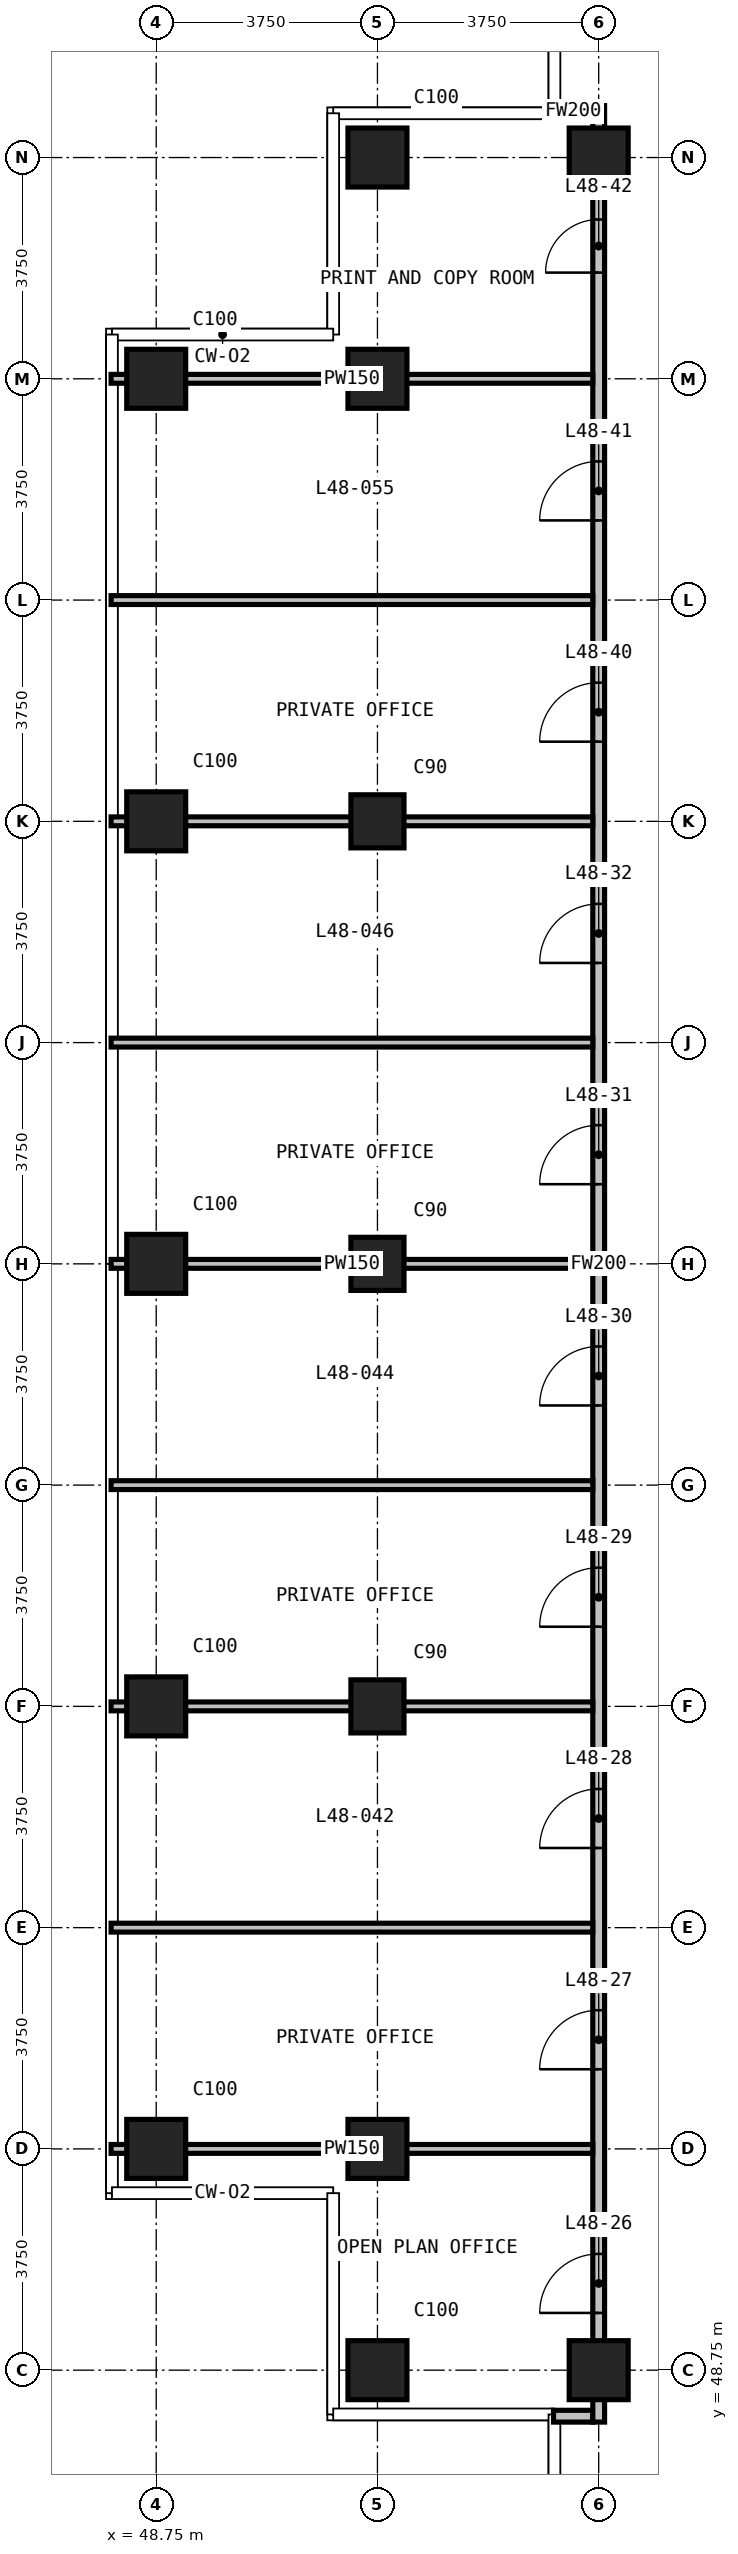
"""IFC4 building model, lengths in metres.
Left out: names, types, materials, properties, quantities, classifications, styles, units other than length and angle.
Written with IfcOpenShell. Run it as: python <this file> out.ifc"""

import sys

from ifc_helpers import new_model, si_unit, direction, frame, frame_2d, origin, origin_2d, place, context, subcontext, project, spatial, rectangle, extrude, element, fill, save


model = new_model("IFC4")
c1 = context("Model", 3, precision=1e-05, world=origin(), true_north=direction((0.0, 1.0)))
c2 = subcontext(c1, "Body", "Model", "MODEL_VIEW")
j1 = project(units=[si_unit("LENGTHUNIT", "METRE"), si_unit("PLANEANGLEUNIT", "RADIAN")], contexts=[c1])
p1 = place(None, origin())
s1 = spatial("IfcSite", under=j1, at=p1, CompositionType="ELEMENT")
p2 = place(p1, origin())
s2 = spatial("IfcBuilding", under=s1, at=p2, CompositionType="ELEMENT")
p3 = place(p2, frame((0.0, 0.0, 188.7)))
s3 = spatial("IfcBuildingStorey", under=s2, at=p3, CompositionType="ELEMENT", Elevation=188.7)
for number, where, z_axis, x_axis in (
    (1, (48.75, 52.5, 0.0), (0.0, 0.0, 1.0), (1.0, 0.0, 0.0)),
    (2, (48.75, 60.0, 0.0), (0.0, 0.0, 1.0), (1.0, 0.0, 0.0)),
    (3, (48.75, 67.5, 0.0), (0.0, 0.0, 1.0), (1.0, 0.0, 0.0)),
    (4, (48.75, 75.0, 0.0), (0.0, 0.0, 1.0), (1.0, 0.0, 0.0)),
    (5, (48.75, 82.5, 0.0), (0.0, 0.0, 1.0), (1.0, 0.0, 0.0)),
    (6, (52.5, 48.75, 0.0), (0.0, 0.0, 1.0), (1.0, 0.0, 0.0)),
    (7, (52.5, 52.5, 0.0), (0.0, 0.0, 1.0), (1.0, 0.0, 0.0)),
):
    element("IfcColumn", number, at=place(p3, frame(where, z_axis=z_axis, x_axis=x_axis)), inside=s3, PredefinedType="COLUMN", context=c2, shape_type="SweptSolid", body=[
        extrude(rectangle(XDim=1.0, YDim=1.0, at=origin_2d()), origin(), (0.0, 0.0, 1.0), 3.6),
    ])
for number, where, z_axis, x_axis in (
    (8, (52.5, 60.0, 0.0), (0.0, 0.0, 1.0), (1.0, 0.0, 0.0)),
    (9, (52.5, 67.5, 0.0), (0.0, 0.0, 1.0), (1.0, 0.0, 0.0)),
    (10, (52.5, 75.0, 0.0), (0.0, 0.0, 1.0), (1.0, 0.0, 0.0)),
):
    element("IfcColumn", number, at=place(p3, frame(where, z_axis=z_axis, x_axis=x_axis)), inside=s3, PredefinedType="COLUMN", context=c2, shape_type="SweptSolid", body=[
        extrude(rectangle(XDim=0.9, YDim=0.9, at=origin_2d()), origin(), (0.0, 0.0, 1.0), 3.6),
    ])
for number, where, z_axis, x_axis in (
    (11, (52.5, 82.5, 0.0), (0.0, 0.0, 1.0), (1.0, 0.0, 0.0)),
    (12, (52.5, 86.25, 0.0), (0.0, 0.0, 1.0), (1.0, 0.0, 0.0)),
    (13, (56.25, 48.75, 0.0), (0.0, 0.0, 1.0), (1.0, 0.0, 0.0)),
    (14, (56.25, 86.25, 0.0), (0.0, 0.0, 1.0), (1.0, 0.0, 0.0)),
):
    element("IfcColumn", number, at=place(p3, frame(where, z_axis=z_axis, x_axis=x_axis)), inside=s3, PredefinedType="COLUMN", context=c2, shape_type="SweptSolid", body=[
        extrude(rectangle(XDim=1.0, YDim=1.0, at=origin_2d()), origin(), (0.0, 0.0, 1.0), 3.6),
    ])
for number, where, z_axis, x_axis in (
    (15, (55.485, 47.97, 0.0), (0.0, 0.0, 1.0), (1.0, 0.0, 0.0)),
    (16, (55.485, 87.03, 0.0), (0.0, 0.0, 1.0), (1.0, 0.0, 0.0)),
):
    element("IfcWall", number, at=place(p3, frame(where, z_axis=z_axis, x_axis=x_axis)), inside=s3, PredefinedType="PARTITIONING", context=c2, shape_type="SweptSolid", body=[
        extrude(rectangle(XDim=0.665, YDim=0.2, at=frame_2d((0.333, 0.0))), origin(), (0.0, 0.0, 1.0), 3.3),
    ])
p4 = place(p3, frame((56.25, 47.87, 0.0), z_axis=(0.0, 0.0, 1.0), x_axis=(0.0, 1.0, 0.0)))
e17 = element("IfcWall", 17, at=p4, inside=s3, PredefinedType="PARTITIONING", context=c2, shape_type="SweptSolid", body=[
    extrude(rectangle(XDim=39.26, YDim=0.2, at=frame_2d((19.63, 0.0))), origin(), (0.0, 0.0, 1.0), 3.3),
])
p5 = place(p4, frame((1.85, 0.0, 0.0)))
e18 = element("IfcOpeningElement", 18, at=p5, cuts=e17, PredefinedType="OPENING", context=c2, shape_type="SweptSolid", body=[
    extrude(rectangle(XDim=1.0, YDim=2.2, at=frame_2d((0.5, 1.1))), frame((0.0, 0.11, 0.0), z_axis=(0.0, -1.0, 0.0), x_axis=(1.0, 0.0, 0.0)), (0.0, 0.0, 1.0), 0.22),
])
p6 = place(p4, frame((5.98, 0.0, 0.0)))
e19 = element("IfcOpeningElement", 19, at=p6, cuts=e17, PredefinedType="OPENING", context=c2, shape_type="SweptSolid", body=[
    extrude(rectangle(XDim=1.0, YDim=2.2, at=frame_2d((0.5, 1.1))), frame((0.0, 0.11, 0.0), z_axis=(0.0, -1.0, 0.0), x_axis=(1.0, 0.0, 0.0)), (0.0, 0.0, 1.0), 0.22),
])
p7 = place(p4, frame((9.73, 0.0, 0.0)))
e20 = element("IfcOpeningElement", 20, at=p7, cuts=e17, PredefinedType="OPENING", context=c2, shape_type="SweptSolid", body=[
    extrude(rectangle(XDim=1.0, YDim=2.2, at=frame_2d((0.5, 1.1))), frame((0.0, 0.11, 0.0), z_axis=(0.0, -1.0, 0.0), x_axis=(1.0, 0.0, 0.0)), (0.0, 0.0, 1.0), 0.22),
])
p8 = place(p4, frame((13.48, 0.0, 0.0)))
e21 = element("IfcOpeningElement", 21, at=p8, cuts=e17, PredefinedType="OPENING", context=c2, shape_type="SweptSolid", body=[
    extrude(rectangle(XDim=1.0, YDim=2.2, at=frame_2d((0.5, 1.1))), frame((0.0, 0.11, 0.0), z_axis=(0.0, -1.0, 0.0), x_axis=(1.0, 0.0, 0.0)), (0.0, 0.0, 1.0), 0.22),
])
p9 = place(p4, frame((17.23, 0.0, 0.0)))
e22 = element("IfcOpeningElement", 22, at=p9, cuts=e17, PredefinedType="OPENING", context=c2, shape_type="SweptSolid", body=[
    extrude(rectangle(XDim=1.0, YDim=2.2, at=frame_2d((0.5, 1.1))), frame((0.0, 0.11, 0.0), z_axis=(0.0, -1.0, 0.0), x_axis=(1.0, 0.0, 0.0)), (0.0, 0.0, 1.0), 0.22),
])
p10 = place(p4, frame((20.98, 0.0, 0.0)))
e23 = element("IfcOpeningElement", 23, at=p10, cuts=e17, PredefinedType="OPENING", context=c2, shape_type="SweptSolid", body=[
    extrude(rectangle(XDim=1.0, YDim=2.2, at=frame_2d((0.5, 1.1))), frame((0.0, 0.11, 0.0), z_axis=(0.0, -1.0, 0.0), x_axis=(1.0, 0.0, 0.0)), (0.0, 0.0, 1.0), 0.22),
])
p11 = place(p4, frame((24.73, 0.0, 0.0)))
e24 = element("IfcOpeningElement", 24, at=p11, cuts=e17, PredefinedType="OPENING", context=c2, shape_type="SweptSolid", body=[
    extrude(rectangle(XDim=1.0, YDim=2.2, at=frame_2d((0.5, 1.1))), frame((0.0, 0.11, 0.0), z_axis=(0.0, -1.0, 0.0), x_axis=(1.0, 0.0, 0.0)), (0.0, 0.0, 1.0), 0.22),
])
p12 = place(p4, frame((28.48, 0.0, 0.0)))
e25 = element("IfcOpeningElement", 25, at=p12, cuts=e17, PredefinedType="OPENING", context=c2, shape_type="SweptSolid", body=[
    extrude(rectangle(XDim=1.0, YDim=2.2, at=frame_2d((0.5, 1.1))), frame((0.0, 0.11, 0.0), z_axis=(0.0, -1.0, 0.0), x_axis=(1.0, 0.0, 0.0)), (0.0, 0.0, 1.0), 0.22),
])
p13 = place(p4, frame((32.23, 0.0, 0.0)))
e26 = element("IfcOpeningElement", 26, at=p13, cuts=e17, PredefinedType="OPENING", context=c2, shape_type="SweptSolid", body=[
    extrude(rectangle(XDim=1.0, YDim=2.2, at=frame_2d((0.5, 1.1))), frame((0.0, 0.11, 0.0), z_axis=(0.0, -1.0, 0.0), x_axis=(1.0, 0.0, 0.0)), (0.0, 0.0, 1.0), 0.22),
])
p14 = place(p4, frame((36.43, 0.0, 0.0)))
e27 = element("IfcOpeningElement", 27, at=p14, cuts=e17, PredefinedType="OPENING", context=c2, shape_type="SweptSolid", body=[
    extrude(rectangle(XDim=0.9, YDim=2.2, at=frame_2d((0.45, 1.1))), frame((0.0, 0.11, 0.0), z_axis=(0.0, -1.0, 0.0), x_axis=(1.0, 0.0, 0.0)), (0.0, 0.0, 1.0), 0.22),
])
for number, where, z_axis, x_axis in (
    (28, (47.985, 52.5, 0.0), (0.0, 0.0, 1.0), (1.0, 0.0, 0.0)),
    (29, (47.985, 56.25, 0.0), (0.0, 0.0, 1.0), (1.0, 0.0, 0.0)),
    (30, (47.985, 60.0, 0.0), (0.0, 0.0, 1.0), (1.0, 0.0, 0.0)),
    (31, (47.985, 63.75, 0.0), (0.0, 0.0, 1.0), (1.0, 0.0, 0.0)),
    (32, (47.985, 67.5, 0.0), (0.0, 0.0, 1.0), (1.0, 0.0, 0.0)),
    (33, (47.985, 71.25, 0.0), (0.0, 0.0, 1.0), (1.0, 0.0, 0.0)),
    (34, (47.985, 75.0, 0.0), (0.0, 0.0, 1.0), (1.0, 0.0, 0.0)),
    (35, (47.985, 78.75, 0.0), (0.0, 0.0, 1.0), (1.0, 0.0, 0.0)),
    (36, (47.985, 82.5, 0.0), (0.0, 0.0, 1.0), (1.0, 0.0, 0.0)),
):
    element("IfcWall", number, at=place(p3, frame(where, z_axis=z_axis, x_axis=x_axis)), inside=s3, PredefinedType="PARTITIONING", context=c2, shape_type="SweptSolid", body=[
        extrude(rectangle(XDim=8.165, YDim=0.15, at=frame_2d((4.083, 0.0))), origin(), (0.0, 0.0, 1.0), 3.3),
    ])
p15 = place(p5, origin())
e37 = element("IfcDoor", 37, at=p15, inside=s3, OperationType="SINGLE_SWING_RIGHT", PredefinedType="DOOR", context=c2, shape_type="SweptSolid", body=[
    extrude(rectangle(XDim=1.0, YDim=2.2, at=frame_2d((0.5, 1.1))), frame((0.0, 0.025, 0.0), z_axis=(0.0, -1.0, 0.0), x_axis=(1.0, 0.0, 0.0)), (0.0, 0.0, 1.0), 0.05),
])
fill(e18, e37)
p16 = place(p6, origin())
e38 = element("IfcDoor", 38, at=p16, inside=s3, OperationType="SINGLE_SWING_LEFT", PredefinedType="DOOR", context=c2, shape_type="SweptSolid", body=[
    extrude(rectangle(XDim=1.0, YDim=2.2, at=frame_2d((0.5, 1.1))), frame((0.0, 0.025, 0.0), z_axis=(0.0, -1.0, 0.0), x_axis=(1.0, 0.0, 0.0)), (0.0, 0.0, 1.0), 0.05),
])
fill(e19, e38)
p17 = place(p7, origin())
e39 = element("IfcDoor", 39, at=p17, inside=s3, OperationType="SINGLE_SWING_LEFT", PredefinedType="DOOR", context=c2, shape_type="SweptSolid", body=[
    extrude(rectangle(XDim=1.0, YDim=2.2, at=frame_2d((0.5, 1.1))), frame((0.0, 0.025, 0.0), z_axis=(0.0, -1.0, 0.0), x_axis=(1.0, 0.0, 0.0)), (0.0, 0.0, 1.0), 0.05),
])
fill(e20, e39)
p18 = place(p8, origin())
e40 = element("IfcDoor", 40, at=p18, inside=s3, OperationType="SINGLE_SWING_LEFT", PredefinedType="DOOR", context=c2, shape_type="SweptSolid", body=[
    extrude(rectangle(XDim=1.0, YDim=2.2, at=frame_2d((0.5, 1.1))), frame((0.0, 0.025, 0.0), z_axis=(0.0, -1.0, 0.0), x_axis=(1.0, 0.0, 0.0)), (0.0, 0.0, 1.0), 0.05),
])
fill(e21, e40)
p19 = place(p9, origin())
e41 = element("IfcDoor", 41, at=p19, inside=s3, OperationType="SINGLE_SWING_LEFT", PredefinedType="DOOR", context=c2, shape_type="SweptSolid", body=[
    extrude(rectangle(XDim=1.0, YDim=2.2, at=frame_2d((0.5, 1.1))), frame((0.0, 0.025, 0.0), z_axis=(0.0, -1.0, 0.0), x_axis=(1.0, 0.0, 0.0)), (0.0, 0.0, 1.0), 0.05),
])
fill(e22, e41)
p20 = place(p10, origin())
e42 = element("IfcDoor", 42, at=p20, inside=s3, OperationType="SINGLE_SWING_LEFT", PredefinedType="DOOR", context=c2, shape_type="SweptSolid", body=[
    extrude(rectangle(XDim=1.0, YDim=2.2, at=frame_2d((0.5, 1.1))), frame((0.0, 0.025, 0.0), z_axis=(0.0, -1.0, 0.0), x_axis=(1.0, 0.0, 0.0)), (0.0, 0.0, 1.0), 0.05),
])
fill(e23, e42)
p21 = place(p11, origin())
e43 = element("IfcDoor", 43, at=p21, inside=s3, OperationType="SINGLE_SWING_LEFT", PredefinedType="DOOR", context=c2, shape_type="SweptSolid", body=[
    extrude(rectangle(XDim=1.0, YDim=2.2, at=frame_2d((0.5, 1.1))), frame((0.0, 0.025, 0.0), z_axis=(0.0, -1.0, 0.0), x_axis=(1.0, 0.0, 0.0)), (0.0, 0.0, 1.0), 0.05),
])
fill(e24, e43)
p22 = place(p12, origin())
e44 = element("IfcDoor", 44, at=p22, inside=s3, OperationType="SINGLE_SWING_LEFT", PredefinedType="DOOR", context=c2, shape_type="SweptSolid", body=[
    extrude(rectangle(XDim=1.0, YDim=2.2, at=frame_2d((0.5, 1.1))), frame((0.0, 0.025, 0.0), z_axis=(0.0, -1.0, 0.0), x_axis=(1.0, 0.0, 0.0)), (0.0, 0.0, 1.0), 0.05),
])
fill(e25, e44)
p23 = place(p13, origin())
e45 = element("IfcDoor", 45, at=p23, inside=s3, OperationType="SINGLE_SWING_LEFT", PredefinedType="DOOR", context=c2, shape_type="SweptSolid", body=[
    extrude(rectangle(XDim=1.0, YDim=2.2, at=frame_2d((0.5, 1.1))), frame((0.0, 0.025, 0.0), z_axis=(0.0, -1.0, 0.0), x_axis=(1.0, 0.0, 0.0)), (0.0, 0.0, 1.0), 0.05),
])
fill(e26, e45)
p24 = place(p14, origin())
e46 = element("IfcDoor", 46, at=p24, inside=s3, OperationType="SINGLE_SWING_LEFT", PredefinedType="DOOR", context=c2, shape_type="SweptSolid", body=[
    extrude(rectangle(XDim=0.9, YDim=2.2, at=frame_2d((0.45, 1.1))), frame((0.0, 0.025, 0.0), z_axis=(0.0, -1.0, 0.0), x_axis=(1.0, 0.0, 0.0)), (0.0, 0.0, 1.0), 0.05),
])
fill(e27, e46)
save(model, sys.argv[1])
